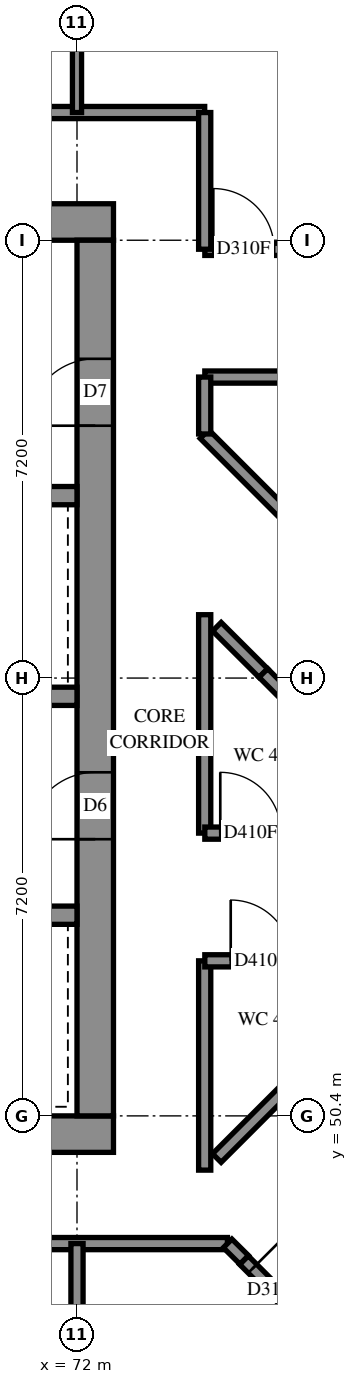
"""IFC4 building model, lengths in metres.
Left out: names, types, materials, properties, quantities, classifications, styles, units other than length and angle.
Written with IfcOpenShell. Run it as: python <this file> out.ifc"""

import sys

from ifc_helpers import new_model, si_unit, direction, frame, frame_2d, origin, place, context, subcontext, project, spatial, rectangle, extrude, element, fill, save


model = new_model("IFC4")
c1 = context("Model", 3, precision=1e-05, world=origin(), true_north=direction((0.0, 1.0)))
c2 = subcontext(c1, "Body", "Model", "MODEL_VIEW")
j1 = project(units=[si_unit("LENGTHUNIT", "METRE"), si_unit("PLANEANGLEUNIT", "RADIAN")], contexts=[c1])
p1 = place(None, origin())
s1 = spatial("IfcSite", under=j1, at=p1, CompositionType="ELEMENT")
p2 = place(p1, origin())
s2 = spatial("IfcBuilding", under=s1, at=p2, CompositionType="ELEMENT")
p3 = place(p2, frame((0.0, 0.0, 169.4)))
s3 = spatial("IfcBuildingStorey", under=s2, at=p3, CompositionType="ELEMENT", Elevation=169.4)
p4 = place(p3, frame((57.0, 50.1, -0.3), z_axis=(0.0, 0.0, 1.0), x_axis=(1.0, 0.0, 0.0)))
e1 = element("IfcWall", 1, at=p4, inside=s3, PredefinedType="SHEAR", context=c2, shape_type="SweptSolid", body=[
    extrude(rectangle(XDim=15.6, YDim=0.6, at=frame_2d((7.8, 0.0))), origin(), (0.0, 0.0, 1.0), 2.7),
])
p5 = place(p3, frame((57.0, 65.1, -0.3), z_axis=(0.0, 0.0, 1.0), x_axis=(1.0, 0.0, 0.0)))
e2 = element("IfcWall", 2, at=p5, inside=s3, PredefinedType="SHEAR", context=c2, shape_type="SweptSolid", body=[
    extrude(rectangle(XDim=15.6, YDim=0.6, at=frame_2d((7.8, 0.0))), origin(), (0.0, 0.0, 1.0), 2.7),
])
p6 = place(p5, frame((10.6, 0.0, 0.3)))
e3 = element("IfcOpeningElement", 3, at=p6, cuts=e2, PredefinedType="OPENING", context=c2, shape_type="SweptSolid", body=[
    extrude(rectangle(XDim=0.8, YDim=2.1, at=frame_2d((0.4, 1.05))), frame((0.0, 0.31, 0.0), z_axis=(0.0, -1.0, 0.0), x_axis=(1.0, 0.0, 0.0)), (0.0, 0.0, 1.0), 0.62),
])
p7 = place(p3, frame((72.3, 50.4, -0.3), z_axis=(0.0, 0.0, 1.0), x_axis=(0.0, 1.0, 0.0)))
e4 = element("IfcWall", 4, at=p7, inside=s3, PredefinedType="SHEAR", context=c2, shape_type="SweptSolid", body=[
    extrude(rectangle(XDim=14.4, YDim=0.6, at=frame_2d((7.2, 0.0))), origin(), (0.0, 0.0, 1.0), 2.7),
])
p8 = place(p7, frame((4.55, 0.0, 0.3)))
e5 = element("IfcOpeningElement", 5, at=p8, cuts=e4, PredefinedType="OPENING", context=c2, shape_type="SweptSolid", body=[
    extrude(rectangle(XDim=1.1, YDim=2.1, at=frame_2d((0.55, 1.05))), frame((0.0, 0.31, 0.0), z_axis=(0.0, -1.0, 0.0), x_axis=(1.0, 0.0, 0.0)), (0.0, 0.0, 1.0), 0.62),
])
p9 = place(p7, frame((11.35, 0.0, 0.3)))
e6 = element("IfcOpeningElement", 6, at=p9, cuts=e4, PredefinedType="OPENING", context=c2, shape_type="SweptSolid", body=[
    extrude(rectangle(XDim=1.1, YDim=2.1, at=frame_2d((0.55, 1.05))), frame((0.0, 0.31, 0.0), z_axis=(0.0, -1.0, 0.0), x_axis=(1.0, 0.0, 0.0)), (0.0, 0.0, 1.0), 0.62),
])
p10 = place(p3, frame((57.6, 53.7, 0.0), z_axis=(0.0, 0.0, 1.0), x_axis=(1.0, 0.0, 0.0)))
e7 = element("IfcWall", 7, at=p10, inside=s3, PredefinedType="SOLIDWALL", context=c2, shape_type="SweptSolid", body=[
    extrude(rectangle(XDim=14.4, YDim=0.3, at=frame_2d((7.2, 0.0))), origin(), (0.0, 0.0, 1.0), 3.1),
])
p11 = place(p10, frame((1.35, 0.0, 0.0)))
e8 = element("IfcOpeningElement", 8, at=p11, cuts=e7, PredefinedType="OPENING", context=c2, shape_type="SweptSolid", body=[
    extrude(rectangle(XDim=0.9, YDim=2.1, at=frame_2d((0.45, 1.05))), frame((0.0, 0.16, 0.0), z_axis=(0.0, -1.0, 0.0), x_axis=(1.0, 0.0, 0.0)), (0.0, 0.0, 1.0), 0.32),
])
p12 = place(p10, frame((4.95, 0.0, 0.0)))
e9 = element("IfcOpeningElement", 9, at=p12, cuts=e7, PredefinedType="OPENING", context=c2, shape_type="SweptSolid", body=[
    extrude(rectangle(XDim=0.9, YDim=2.1, at=frame_2d((0.45, 1.05))), frame((0.0, 0.16, 0.0), z_axis=(0.0, -1.0, 0.0), x_axis=(1.0, 0.0, 0.0)), (0.0, 0.0, 1.0), 0.32),
])
p13 = place(p10, frame((8.55, 0.0, 0.0)))
e10 = element("IfcOpeningElement", 10, at=p13, cuts=e7, PredefinedType="OPENING", context=c2, shape_type="SweptSolid", body=[
    extrude(rectangle(XDim=0.9, YDim=2.1, at=frame_2d((0.45, 1.05))), frame((0.0, 0.16, 0.0), z_axis=(0.0, -1.0, 0.0), x_axis=(1.0, 0.0, 0.0)), (0.0, 0.0, 1.0), 0.32),
])
p14 = place(p10, frame((12.05, 0.0, 0.0)))
e11 = element("IfcOpeningElement", 11, at=p14, cuts=e7, PredefinedType="OPENING", context=c2, shape_type="SweptSolid", body=[
    extrude(rectangle(XDim=1.1, YDim=2.1, at=frame_2d((0.55, 1.05))), frame((0.0, 0.16, 0.0), z_axis=(0.0, -1.0, 0.0), x_axis=(1.0, 0.0, 0.0)), (0.0, 0.0, 1.0), 0.32),
])
p15 = place(p3, frame((57.6, 57.3, 0.0), z_axis=(0.0, 0.0, 1.0), x_axis=(1.0, 0.0, 0.0)))
e12 = element("IfcWall", 12, at=p15, inside=s3, PredefinedType="SOLIDWALL", context=c2, shape_type="SweptSolid", body=[
    extrude(rectangle(XDim=14.4, YDim=0.3, at=frame_2d((7.2, 0.0))), origin(), (0.0, 0.0, 1.0), 3.1),
])
p16 = place(p15, frame((1.25, 0.0, 0.0)))
e13 = element("IfcOpeningElement", 13, at=p16, cuts=e12, PredefinedType="OPENING", context=c2, shape_type="SweptSolid", body=[
    extrude(rectangle(XDim=1.1, YDim=2.1, at=frame_2d((0.55, 1.05))), frame((0.0, 0.16, 0.0), z_axis=(0.0, -1.0, 0.0), x_axis=(1.0, 0.0, 0.0)), (0.0, 0.0, 1.0), 0.32),
])
p17 = place(p15, frame((4.85, 0.0, 0.0)))
e14 = element("IfcOpeningElement", 14, at=p17, cuts=e12, PredefinedType="OPENING", context=c2, shape_type="SweptSolid", body=[
    extrude(rectangle(XDim=1.1, YDim=2.1, at=frame_2d((0.55, 1.05))), frame((0.0, 0.16, 0.0), z_axis=(0.0, -1.0, 0.0), x_axis=(1.0, 0.0, 0.0)), (0.0, 0.0, 1.0), 0.32),
])
p18 = place(p15, frame((8.45, 0.0, 0.0)))
e15 = element("IfcOpeningElement", 15, at=p18, cuts=e12, PredefinedType="OPENING", context=c2, shape_type="SweptSolid", body=[
    extrude(rectangle(XDim=1.1, YDim=2.1, at=frame_2d((0.55, 1.05))), frame((0.0, 0.16, 0.0), z_axis=(0.0, -1.0, 0.0), x_axis=(1.0, 0.0, 0.0)), (0.0, 0.0, 1.0), 0.32),
])
p19 = place(p15, frame((12.05, 0.0, 0.0)))
e16 = element("IfcOpeningElement", 16, at=p19, cuts=e12, PredefinedType="OPENING", context=c2, shape_type="SweptSolid", body=[
    extrude(rectangle(XDim=1.1, YDim=2.1, at=frame_2d((0.55, 1.05))), frame((0.0, 0.16, 0.0), z_axis=(0.0, -1.0, 0.0), x_axis=(1.0, 0.0, 0.0)), (0.0, 0.0, 1.0), 0.32),
])
p20 = place(p3, frame((64.8, 60.6, 0.0), z_axis=(0.0, 0.0, 1.0), x_axis=(1.0, 0.0, 0.0)))
e17 = element("IfcWall", 17, at=p20, inside=s3, PredefinedType="SOLIDWALL", context=c2, shape_type="SweptSolid", body=[
    extrude(rectangle(XDim=7.2, YDim=0.3, at=frame_2d((3.6, 0.0))), origin(), (0.0, 0.0, 1.0), 3.1),
])
p21 = place(p3, frame((55.5, 48.3, 0.0), z_axis=(0.0, 0.0, 1.0), x_axis=(1.0, 0.0, 0.0)))
e18 = element("IfcWall", 18, at=p21, inside=s3, PredefinedType="PARTITIONING", context=c2, shape_type="SweptSolid", body=[
    extrude(rectangle(XDim=18.974, YDim=0.2, at=frame_2d((9.487, 0.0))), origin(), (0.0, 0.0, 1.0), 3.1),
])
p22 = place(p21, frame((5.963, 0.0, 0.0)))
e19 = element("IfcOpeningElement", 19, at=p22, cuts=e18, PredefinedType="OPENING", context=c2, shape_type="SweptSolid", body=[
    extrude(rectangle(XDim=1.0, YDim=2.1, at=frame_2d((0.5, 1.05))), frame((0.0, 0.11, 0.0), z_axis=(0.0, -1.0, 0.0), x_axis=(1.0, 0.0, 0.0)), (0.0, 0.0, 1.0), 0.22),
])
p23 = place(p21, frame((13.161, 0.0, 0.0)))
e20 = element("IfcOpeningElement", 20, at=p23, cuts=e18, PredefinedType="OPENING", context=c2, shape_type="SweptSolid", body=[
    extrude(rectangle(XDim=0.9, YDim=2.1, at=frame_2d((0.45, 1.05))), frame((0.0, 0.11, 0.0), z_axis=(0.0, -1.0, 0.0), x_axis=(1.0, 0.0, 0.0)), (0.0, 0.0, 1.0), 0.22),
])
p24 = place(p3, frame((55.5, 66.9, 0.0), z_axis=(0.0, 0.0, 1.0), x_axis=(1.0, 0.0, 0.0)))
e21 = element("IfcWall", 21, at=p24, inside=s3, PredefinedType="PARTITIONING", context=c2, shape_type="SweptSolid", body=[
    extrude(rectangle(XDim=18.6, YDim=0.2, at=frame_2d((9.3, 0.0))), origin(), (0.0, 0.0, 1.0), 3.1),
])
p25 = place(p24, frame((4.45, 0.0, 0.0)))
e22 = element("IfcOpeningElement", 22, at=p25, cuts=e21, PredefinedType="OPENING", context=c2, shape_type="SweptSolid", body=[
    extrude(rectangle(XDim=0.9, YDim=2.1, at=frame_2d((0.45, 1.05))), frame((0.0, 0.11, 0.0), z_axis=(0.0, -1.0, 0.0), x_axis=(1.0, 0.0, 0.0)), (0.0, 0.0, 1.0), 0.22),
])
p26 = place(p24, frame((6.1, 0.0, 0.0)))
e23 = element("IfcOpeningElement", 23, at=p26, cuts=e21, PredefinedType="OPENING", context=c2, shape_type="SweptSolid", body=[
    extrude(rectangle(XDim=0.9, YDim=2.1, at=frame_2d((0.45, 1.05))), frame((0.0, 0.11, 0.0), z_axis=(0.0, -1.0, 0.0), x_axis=(1.0, 0.0, 0.0)), (0.0, 0.0, 1.0), 0.22),
])
p27 = place(p24, frame((11.65, 0.0, 0.0)))
e24 = element("IfcOpeningElement", 24, at=p27, cuts=e21, PredefinedType="OPENING", context=c2, shape_type="SweptSolid", body=[
    extrude(rectangle(XDim=0.9, YDim=2.1, at=frame_2d((0.45, 1.05))), frame((0.0, 0.11, 0.0), z_axis=(0.0, -1.0, 0.0), x_axis=(1.0, 0.0, 0.0)), (0.0, 0.0, 1.0), 0.22),
])
p28 = place(p24, frame((13.3, 0.0, 0.0)))
e25 = element("IfcOpeningElement", 25, at=p28, cuts=e21, PredefinedType="OPENING", context=c2, shape_type="SweptSolid", body=[
    extrude(rectangle(XDim=0.9, YDim=2.1, at=frame_2d((0.45, 1.05))), frame((0.0, 0.11, 0.0), z_axis=(0.0, -1.0, 0.0), x_axis=(1.0, 0.0, 0.0)), (0.0, 0.0, 1.0), 0.22),
])
p29 = place(p3, frame((74.097, 61.611, 0.0), z_axis=(0.0, 0.0, 1.0), x_axis=(0.7071067812, -0.7071067812, 0.0)))
e26 = element("IfcWall", 26, at=p29, inside=s3, PredefinedType="PARTITIONING", context=c2, shape_type="SweptSolid", body=[
    extrude(rectangle(XDim=8.061, YDim=0.2, at=frame_2d((4.03, 0.0))), origin(), (0.0, 0.0, 1.0), 3.1),
])
p30 = place(p3, frame((74.102, 62.55, 0.0), z_axis=(0.0, 0.0, 1.0), x_axis=(1.0, 0.0, 0.0)))
e27 = element("IfcWall", 27, at=p30, inside=s3, PredefinedType="PARTITIONING", context=c2, shape_type="SweptSolid", body=[
    extrude(rectangle(XDim=5.098, YDim=0.2, at=frame_2d((2.549, 0.0))), origin(), (0.0, 0.0, 1.0), 3.1),
])
p31 = place(p30, frame((1.319, 0.0, 0.0)))
e28 = element("IfcOpeningElement", 28, at=p31, cuts=e27, PredefinedType="OPENING", context=c2, shape_type="SweptSolid", body=[
    extrude(rectangle(XDim=1.0, YDim=2.1, at=frame_2d((0.5, 1.05))), frame((0.0, 0.11, 0.0), z_axis=(0.0, -1.0, 0.0), x_axis=(1.0, 0.0, 0.0)), (0.0, 0.0, 1.0), 0.22),
])
p32 = place(p3, frame((72.0, 43.65, 0.0), z_axis=(0.0, 0.0, 1.0), x_axis=(0.0, 1.0, 0.0)))
e29 = element("IfcWall", 29, at=p32, inside=s3, PredefinedType="PARTITIONING", context=c2, shape_type="SweptSolid", body=[
    extrude(rectangle(XDim=4.65, YDim=0.2, at=frame_2d((2.325, 0.0))), origin(), (0.0, 0.0, 1.0), 3.1),
])
p33 = place(p3, frame((74.102, 64.65, 0.0), z_axis=(0.0, 0.0, 1.0), x_axis=(1.0, 0.0, 0.0)))
e30 = element("IfcWall", 30, at=p33, inside=s3, PredefinedType="PARTITIONING", context=c2, shape_type="SweptSolid", body=[
    extrude(rectangle(XDim=4.648, YDim=0.2, at=frame_2d((2.324, 0.0))), origin(), (0.0, 0.0, 1.0), 3.1),
])
p34 = place(p33, frame((0.14, 0.0, 0.0)))
e31 = element("IfcOpeningElement", 31, at=p34, cuts=e30, PredefinedType="OPENING", context=c2, shape_type="SweptSolid", body=[
    extrude(rectangle(XDim=1.0, YDim=2.1, at=frame_2d((0.5, 1.05))), frame((0.0, 0.11, 0.0), z_axis=(0.0, -1.0, 0.0), x_axis=(1.0, 0.0, 0.0)), (0.0, 0.0, 1.0), 0.22),
])
p35 = place(p3, frame((74.3, 49.706, 0.0), z_axis=(0.0, 0.0, 1.0), x_axis=(0.7071067812, 0.7071067812, 0.0)))
e32 = element("IfcWall", 32, at=p35, inside=s3, PredefinedType="PARTITIONING", context=c2, shape_type="SweptSolid", body=[
    extrude(rectangle(XDim=4.588, YDim=0.2, at=frame_2d((2.294, 0.0))), origin(), (0.0, 0.0, 1.0), 3.1),
])
p36 = place(p3, frame((74.745, 48.029, 0.0), z_axis=(0.0, 0.0, 1.0), x_axis=(0.7068806156, -0.7073328745, 0.0)))
e33 = element("IfcWall", 33, at=p36, inside=s3, PredefinedType="PARTITIONING", context=c2, shape_type="SweptSolid", body=[
    extrude(rectangle(XDim=4.422, YDim=0.2, at=frame_2d((2.211, 0.0))), origin(), (0.0, 0.0, 1.0), 3.1),
])
p37 = place(p36, frame((0.199, 0.0, 0.0)))
e34 = element("IfcOpeningElement", 34, at=p37, cuts=e33, PredefinedType="OPENING", context=c2, shape_type="SweptSolid", body=[
    extrude(rectangle(XDim=1.0, YDim=2.1, at=frame_2d((0.5, 1.05))), frame((0.0, 0.11, 0.0), z_axis=(0.0, -1.0, 0.0), x_axis=(1.0, 0.0, 0.0)), (0.0, 0.0, 1.0), 0.22),
])
p38 = place(p3, frame((74.1, 55.05, 0.0), z_axis=(0.0, 0.0, 1.0), x_axis=(0.0, 1.0, 0.0)))
e35 = element("IfcWall", 35, at=p38, inside=s3, PredefinedType="PARTITIONING", context=c2, shape_type="SweptSolid", body=[
    extrude(rectangle(XDim=3.592, YDim=0.2, at=frame_2d((1.796, 0.0))), origin(), (0.0, 0.0, 1.0), 3.1),
])
p39 = place(p3, frame((74.1, 49.508, 0.0), z_axis=(0.0, 0.0, 1.0), x_axis=(0.0, 1.0, 0.0)))
e36 = element("IfcWall", 36, at=p39, inside=s3, PredefinedType="PARTITIONING", context=c2, shape_type="SweptSolid", body=[
    extrude(rectangle(XDim=3.442, YDim=0.2, at=frame_2d((1.721, 0.0))), origin(), (0.0, 0.0, 1.0), 3.1),
])
p40 = place(p3, frame((74.102, 52.95, 0.0), z_axis=(0.0, 0.0, 1.0), x_axis=(1.0, 0.0, 0.0)))
e37 = element("IfcWall", 37, at=p40, inside=s3, PredefinedType="PARTITIONING", context=c2, shape_type="SweptSolid", body=[
    extrude(rectangle(XDim=3.44, YDim=0.2, at=frame_2d((1.72, 0.0))), origin(), (0.0, 0.0, 1.0), 3.1),
])
p41 = place(p40, frame((0.426, 0.0, 0.0)))
e38 = element("IfcOpeningElement", 38, at=p41, cuts=e37, PredefinedType="OPENING", context=c2, shape_type="SweptSolid", body=[
    extrude(rectangle(XDim=1.0, YDim=2.1, at=frame_2d((0.5, 1.05))), frame((0.0, 0.11, 0.0), z_axis=(0.0, -1.0, 0.0), x_axis=(1.0, 0.0, 0.0)), (0.0, 0.0, 1.0), 0.22),
])
p42 = place(p3, frame((74.102, 55.05, 0.0), z_axis=(0.0, 0.0, 1.0), x_axis=(1.0, 0.0, 0.0)))
e39 = element("IfcWall", 39, at=p42, inside=s3, PredefinedType="PARTITIONING", context=c2, shape_type="SweptSolid", body=[
    extrude(rectangle(XDim=2.794, YDim=0.2, at=frame_2d((1.397, 0.0))), origin(), (0.0, 0.0, 1.0), 3.1),
])
p43 = place(p42, frame((0.254, 0.0, 0.0)))
e40 = element("IfcOpeningElement", 40, at=p43, cuts=e39, PredefinedType="OPENING", context=c2, shape_type="SweptSolid", body=[
    extrude(rectangle(XDim=1.0, YDim=2.1, at=frame_2d((0.5, 1.05))), frame((0.0, 0.11, 0.0), z_axis=(0.0, -1.0, 0.0), x_axis=(1.0, 0.0, 0.0)), (0.0, 0.0, 1.0), 0.22),
])
p44 = place(p3, frame((72.0, 66.9, 0.0), z_axis=(0.0, 0.0, 1.0), x_axis=(0.0, 1.0, 0.0)))
e41 = element("IfcWall", 41, at=p44, inside=s3, PredefinedType="PARTITIONING", context=c2, shape_type="SweptSolid", body=[
    extrude(rectangle(XDim=2.4, YDim=0.15, at=frame_2d((1.2, 0.0))), origin(), (0.0, 0.0, 1.0), 3.1),
])
p45 = place(p3, frame((74.1, 64.652, 0.0), z_axis=(0.0, 0.0, 1.0), x_axis=(0.0, 1.0, 0.0)))
e42 = element("IfcWall", 42, at=p45, inside=s3, PredefinedType="PARTITIONING", context=c2, shape_type="SweptSolid", body=[
    extrude(rectangle(XDim=2.248, YDim=0.2, at=frame_2d((1.124, 0.0))), origin(), (0.0, 0.0, 1.0), 3.1),
])
p46 = place(p3, frame((74.3, 58.444, 0.0), z_axis=(0.0, 0.0, 1.0), x_axis=(0.7080329185, -0.7061794292, 0.0)))
e43 = element("IfcWall", 43, at=p46, inside=s3, PredefinedType="PARTITIONING", context=c2, shape_type="SweptSolid", body=[
    extrude(rectangle(XDim=1.079, YDim=0.2, at=frame_2d((0.539, 0.0))), origin(), (0.0, 0.0, 1.0), 3.1),
])
p47 = place(p3, frame((74.1, 61.614, 0.0), z_axis=(0.0, 0.0, 1.0), x_axis=(0.0, 1.0, 0.0)))
e44 = element("IfcWall", 44, at=p47, inside=s3, PredefinedType="PARTITIONING", context=c2, shape_type="SweptSolid", body=[
    extrude(rectangle(XDim=0.936, YDim=0.2, at=frame_2d((0.468, 0.0))), origin(), (0.0, 0.0, 1.0), 3.1),
])
p48 = place(p3, frame((75.065, 57.683, 0.0), z_axis=(0.0, 0.0, 1.0), x_axis=(0.705788785, -0.7084223253, 0.0)))
e45 = element("IfcWall", 45, at=p48, inside=s3, PredefinedType="PARTITIONING", context=c2, shape_type="SweptSolid", body=[
    extrude(rectangle(XDim=0.759, YDim=0.2, at=frame_2d((0.38, 0.0))), origin(), (0.0, 0.0, 1.0), 3.1),
])
p49 = place(p3, frame((74.477, 48.303, 0.0), z_axis=(0.0, 0.0, 1.0), x_axis=(0.7097111995, -0.7044927348, 0.0)))
e46 = element("IfcWall", 46, at=p49, inside=s3, PredefinedType="PARTITIONING", context=c2, shape_type="SweptSolid", body=[
    extrude(rectangle(XDim=0.383, YDim=0.2, at=frame_2d((0.192, 0.0))), origin(), (0.0, 0.0, 1.0), 3.1),
])
p50 = place(p8, origin())
e47 = element("IfcDoor", 47, at=p50, inside=s3, OperationType="DOUBLE_DOOR_SINGLE_SWING", PredefinedType="DOOR", context=c2, shape_type="SweptSolid", body=[
    extrude(rectangle(XDim=1.1, YDim=2.1, at=frame_2d((0.55, 1.05))), frame((0.0, 0.025, 0.0), z_axis=(0.0, -1.0, 0.0), x_axis=(1.0, 0.0, 0.0)), (0.0, 0.0, 1.0), 0.05),
])
fill(e5, e47)
p51 = place(p9, origin())
e48 = element("IfcDoor", 48, at=p51, inside=s3, OperationType="SINGLE_SWING_RIGHT", PredefinedType="DOOR", context=c2, shape_type="SweptSolid", body=[
    extrude(rectangle(XDim=1.1, YDim=2.1, at=frame_2d((0.55, 1.05))), frame((0.0, 0.025, 0.0), z_axis=(0.0, -1.0, 0.0), x_axis=(1.0, 0.0, 0.0)), (0.0, 0.0, 1.0), 0.05),
])
fill(e6, e48)
p52 = place(p41, origin())
e49 = element("IfcDoor", 49, at=p52, inside=s3, OperationType="SINGLE_SWING_RIGHT", PredefinedType="DOOR", context=c2, shape_type="SweptSolid", body=[
    extrude(rectangle(XDim=1.0, YDim=2.1, at=frame_2d((0.5, 1.05))), frame((0.0, 0.025, 0.0), z_axis=(0.0, -1.0, 0.0), x_axis=(1.0, 0.0, 0.0)), (0.0, 0.0, 1.0), 0.05),
])
fill(e38, e49)
p53 = place(p43, origin())
e50 = element("IfcDoor", 50, at=p53, inside=s3, OperationType="SINGLE_SWING_LEFT", PredefinedType="DOOR", context=c2, shape_type="SweptSolid", body=[
    extrude(rectangle(XDim=1.0, YDim=2.1, at=frame_2d((0.5, 1.05))), frame((0.0, 0.025, 0.0), z_axis=(0.0, -1.0, 0.0), x_axis=(1.0, 0.0, 0.0)), (0.0, 0.0, 1.0), 0.05),
])
fill(e40, e50)
p54 = place(p34, origin())
e51 = element("IfcDoor", 51, at=p54, inside=s3, OperationType="SINGLE_SWING_RIGHT", PredefinedType="DOOR", context=c2, shape_type="SweptSolid", body=[
    extrude(rectangle(XDim=1.0, YDim=2.1, at=frame_2d((0.5, 1.05))), frame((0.0, 0.025, 0.0), z_axis=(0.0, -1.0, 0.0), x_axis=(1.0, 0.0, 0.0)), (0.0, 0.0, 1.0), 0.05),
])
fill(e31, e51)
p55 = place(p37, origin())
e52 = element("IfcDoor", 52, at=p55, inside=s3, OperationType="SINGLE_SWING_LEFT", PredefinedType="DOOR", context=c2, shape_type="SweptSolid", body=[
    extrude(rectangle(XDim=1.0, YDim=2.1, at=frame_2d((0.5, 1.05))), frame((0.0, 0.025, 0.0), z_axis=(0.0, -1.0, 0.0), x_axis=(1.0, 0.0, 0.0)), (0.0, 0.0, 1.0), 0.05),
])
fill(e34, e52)
save(model, sys.argv[1])
